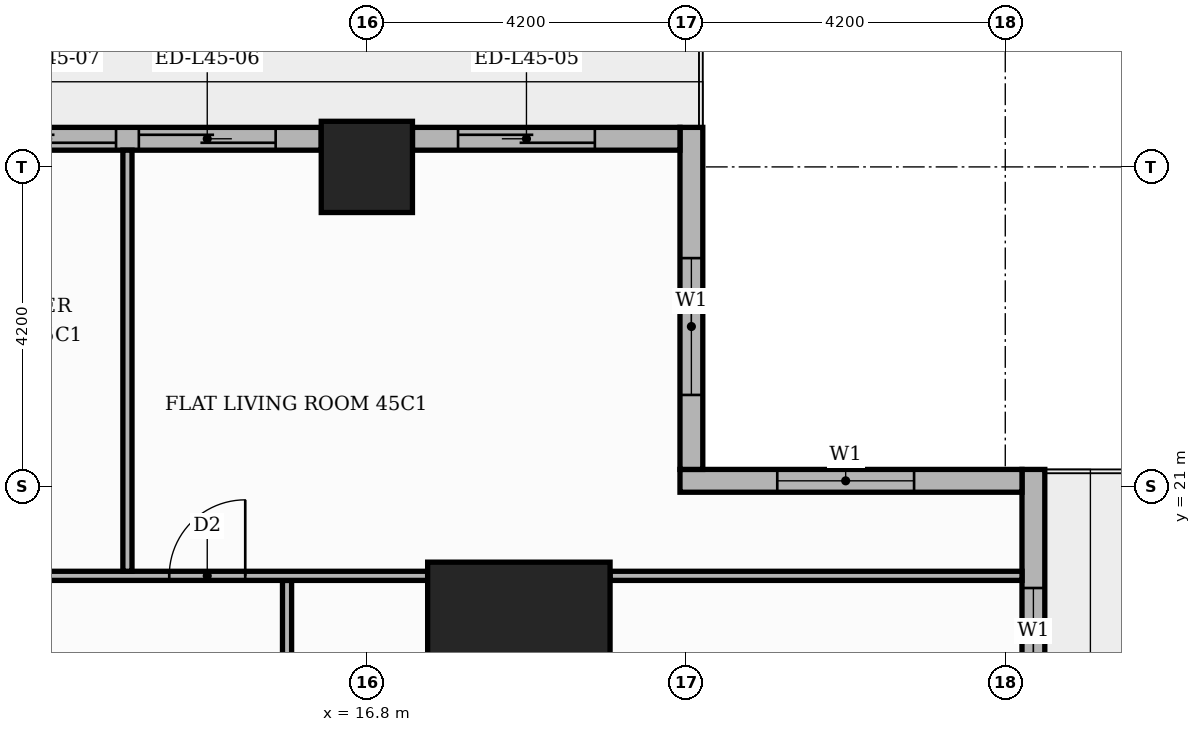
"""IFC4 building model, lengths in metres.
Left out: names, types, materials, properties, quantities, classifications, styles, units other than length and angle.
Written with IfcOpenShell. Run it as: python <this file> out.ifc"""

import sys

from ifc_helpers import new_model, si_unit, direction, frame, frame_2d, origin, origin_2d, place, context, subcontext, project, spatial, rectangle, extrude, element, fill, save


model = new_model("IFC4")
c1 = context("Model", 3, precision=1e-05, world=origin(), true_north=direction((0.0, 1.0)))
c2 = subcontext(c1, "Body", "Model", "MODEL_VIEW")
j1 = project(units=[si_unit("LENGTHUNIT", "METRE"), si_unit("PLANEANGLEUNIT", "RADIAN")], contexts=[c1])
p1 = place(None, origin())
s1 = spatial("IfcSite", under=j1, at=p1, CompositionType="ELEMENT")
p2 = place(p1, origin())
s2 = spatial("IfcBuilding", under=s1, at=p2, CompositionType="ELEMENT")
p3 = place(p2, frame((0.0, 0.0, 192.3)))
s3 = spatial("IfcBuildingStorey", under=s2, at=p3, CompositionType="ELEMENT", Elevation=192.3)
p4 = place(p3, frame((18.8, 18.8, 0.0), z_axis=(0.0, 0.0, 1.0), x_axis=(1.0, 0.0, 0.0)))
e1 = element("IfcColumn", 1, at=p4, inside=s3, PredefinedType="COLUMN", context=c2, shape_type="SweptSolid", body=[
    extrude(rectangle(XDim=2.4, YDim=2.4, at=origin_2d()), origin(), (0.0, 0.0, 1.0), 3.9),
])
p5 = place(p3, frame((16.8, 25.2, 0.0), z_axis=(0.0, 0.0, 1.0), x_axis=(1.0, 0.0, 0.0)))
e2 = element("IfcColumn", 2, at=p5, inside=s3, PredefinedType="COLUMN", context=c2, shape_type="SweptSolid", body=[
    extrude(rectangle(XDim=1.2, YDim=1.2, at=origin_2d()), origin(), (0.0, 0.0, 1.0), 3.9),
])
p6 = place(p3, frame((25.57, 17.4, 0.0), z_axis=(0.0, 0.0, 1.0), x_axis=(0.0, 1.0, 0.0)))
e3 = element("IfcWall", 3, at=p6, inside=s3, PredefinedType="STANDARD", context=c2, shape_type="SweptSolid", body=[
    extrude(rectangle(XDim=3.82, YDim=0.3, at=frame_2d((1.91, 0.0))), origin(), (0.0, 0.0, 1.0), 3.48),
])
p7 = place(p6, frame((0.46, 0.0, 0.9)))
e4 = element("IfcOpeningElement", 4, at=p7, cuts=e3, PredefinedType="OPENING", context=c2, shape_type="SweptSolid", body=[
    extrude(rectangle(XDim=1.8, YDim=2.1, at=frame_2d((0.9, 1.05))), frame((0.0, 0.16, 0.0), z_axis=(0.0, -1.0, 0.0), x_axis=(1.0, 0.0, 0.0)), (0.0, 0.0, 1.0), 0.32),
])
p8 = place(p3, frame((25.42, 21.07, 0.0), z_axis=(0.0, 0.0, 1.0), x_axis=(-1.0, 0.0, 0.0)))
e5 = element("IfcWall", 5, at=p8, inside=s3, PredefinedType="STANDARD", context=c2, shape_type="SweptSolid", body=[
    extrude(rectangle(XDim=4.5, YDim=0.3, at=frame_2d((2.25, 0.0))), origin(), (0.0, 0.0, 1.0), 3.48),
])
p9 = place(p8, frame((1.42, 0.0, 0.9)))
e6 = element("IfcOpeningElement", 6, at=p9, cuts=e5, PredefinedType="OPENING", context=c2, shape_type="SweptSolid", body=[
    extrude(rectangle(XDim=1.8, YDim=2.1, at=frame_2d((0.9, 1.05))), frame((0.0, 0.16, 0.0), z_axis=(0.0, -1.0, 0.0), x_axis=(1.0, 0.0, 0.0)), (0.0, 0.0, 1.0), 0.32),
])
p10 = place(p3, frame((21.07, 21.22, 0.0), z_axis=(0.0, 0.0, 1.0), x_axis=(0.0, 1.0, 0.0)))
e7 = element("IfcWall", 7, at=p10, inside=s3, PredefinedType="STANDARD", context=c2, shape_type="SweptSolid", body=[
    extrude(rectangle(XDim=4.5, YDim=0.3, at=frame_2d((2.25, 0.0))), origin(), (0.0, 0.0, 1.0), 3.48),
])
p11 = place(p10, frame((0.98, 0.0, 0.9)))
e8 = element("IfcOpeningElement", 8, at=p11, cuts=e7, PredefinedType="OPENING", context=c2, shape_type="SweptSolid", body=[
    extrude(rectangle(XDim=1.8, YDim=2.1, at=frame_2d((0.9, 1.05))), frame((0.0, 0.16, 0.0), z_axis=(0.0, -1.0, 0.0), x_axis=(1.0, 0.0, 0.0)), (0.0, 0.0, 1.0), 0.32),
])
p12 = place(p3, frame((20.92, 25.57, 0.0), z_axis=(0.0, 0.0, 1.0), x_axis=(-1.0, 0.0, 0.0)))
e9 = element("IfcWall", 9, at=p12, inside=s3, PredefinedType="STANDARD", context=c2, shape_type="SweptSolid", body=[
    extrude(rectangle(XDim=3.52, YDim=0.3, at=frame_2d((1.76, 0.0))), origin(), (0.0, 0.0, 1.0), 3.48),
])
p13 = place(p12, frame((1.12, 0.0, 0.0)))
e10 = element("IfcOpeningElement", 10, at=p13, cuts=e9, PredefinedType="OPENING", context=c2, shape_type="SweptSolid", body=[
    extrude(rectangle(XDim=1.8, YDim=2.4, at=frame_2d((0.9, 1.2))), frame((0.0, 0.16, 0.0), z_axis=(0.0, -1.0, 0.0), x_axis=(1.0, 0.0, 0.0)), (0.0, 0.0, 1.0), 0.32),
])
p14 = place(p3, frame((16.2, 25.57, 0.0), z_axis=(0.0, 0.0, 1.0), x_axis=(-1.0, 0.0, 0.0)))
e11 = element("IfcWall", 11, at=p14, inside=s3, PredefinedType="STANDARD", context=c2, shape_type="SweptSolid", body=[
    extrude(rectangle(XDim=7.2, YDim=0.3, at=frame_2d((3.6, 0.0))), origin(), (0.0, 0.0, 1.0), 3.48),
])
p15 = place(p14, frame((0.6, 0.0, 0.0)))
e12 = element("IfcOpeningElement", 12, at=p15, cuts=e11, PredefinedType="OPENING", context=c2, shape_type="SweptSolid", body=[
    extrude(rectangle(XDim=1.8, YDim=2.4, at=frame_2d((0.9, 1.2))), frame((0.0, 0.16, 0.0), z_axis=(0.0, -1.0, 0.0), x_axis=(1.0, 0.0, 0.0)), (0.0, 0.0, 1.0), 0.32),
])
p16 = place(p14, frame((2.7, 0.0, 0.0)))
e13 = element("IfcOpeningElement", 13, at=p16, cuts=e11, PredefinedType="OPENING", context=c2, shape_type="SweptSolid", body=[
    extrude(rectangle(XDim=1.8, YDim=2.4, at=frame_2d((0.9, 1.2))), frame((0.0, 0.16, 0.0), z_axis=(0.0, -1.0, 0.0), x_axis=(1.0, 0.0, 0.0)), (0.0, 0.0, 1.0), 0.32),
])
p17 = place(p14, frame((4.8, 0.0, 0.9)))
e14 = element("IfcOpeningElement", 14, at=p17, cuts=e11, PredefinedType="OPENING", context=c2, shape_type="SweptSolid", body=[
    extrude(rectangle(XDim=1.8, YDim=2.1, at=frame_2d((0.9, 1.05))), frame((0.0, 0.16, 0.0), z_axis=(0.0, -1.0, 0.0), x_axis=(1.0, 0.0, 0.0)), (0.0, 0.0, 1.0), 0.32),
])
p18 = place(p3, frame((15.75, 13.75, 0.0), z_axis=(0.0, 0.0, 1.0), x_axis=(0.0, 1.0, 0.0)))
e15 = element("IfcWall", 15, at=p18, inside=s3, PredefinedType="PARTITIONING", context=c2, shape_type="SweptSolid", body=[
    extrude(rectangle(XDim=6.01, YDim=0.12, at=frame_2d((3.005, 0.0))), origin(), (0.0, 0.0, 1.0), 3.48),
])
p19 = place(p18, frame((2.485, 0.0, 0.0)))
e16 = element("IfcOpeningElement", 16, at=p19, cuts=e15, PredefinedType="OPENING", context=c2, shape_type="SweptSolid", body=[
    extrude(rectangle(XDim=1.0, YDim=2.1, at=frame_2d((0.5, 1.05))), frame((0.0, 0.07, 0.0), z_axis=(0.0, -1.0, 0.0), x_axis=(1.0, 0.0, 0.0)), (0.0, 0.0, 1.0), 0.14),
])
p20 = place(p3, frame((5.35, 19.82, 0.0), z_axis=(0.0, 0.0, 1.0), x_axis=(1.0, 0.0, 0.0)))
e17 = element("IfcWall", 17, at=p20, inside=s3, PredefinedType="PARTITIONING", context=c2, shape_type="SweptSolid", body=[
    extrude(rectangle(XDim=12.25, YDim=0.12, at=frame_2d((6.125, 0.0))), origin(), (0.0, 0.0, 1.0), 3.48),
])
p21 = place(p20, frame((8.85, 0.0, 0.0)))
e18 = element("IfcOpeningElement", 18, at=p21, cuts=e17, PredefinedType="OPENING", context=c2, shape_type="SweptSolid", body=[
    extrude(rectangle(XDim=1.0, YDim=2.1, at=frame_2d((0.5, 1.05))), frame((0.0, 0.07, 0.0), z_axis=(0.0, -1.0, 0.0), x_axis=(1.0, 0.0, 0.0)), (0.0, 0.0, 1.0), 0.14),
])
p22 = place(p20, frame((5.75, 0.0, 0.0)))
e19 = element("IfcOpeningElement", 19, at=p22, cuts=e17, PredefinedType="OPENING", context=c2, shape_type="SweptSolid", body=[
    extrude(rectangle(XDim=0.9, YDim=2.1, at=frame_2d((0.45, 1.05))), frame((0.0, 0.07, 0.0), z_axis=(0.0, -1.0, 0.0), x_axis=(1.0, 0.0, 0.0)), (0.0, 0.0, 1.0), 0.14),
])
p23 = place(p3, frame((20.0, 19.82, 0.0), z_axis=(0.0, 0.0, 1.0), x_axis=(1.0, 0.0, 0.0)))
e20 = element("IfcWall", 20, at=p23, inside=s3, PredefinedType="PARTITIONING", context=c2, shape_type="SweptSolid", body=[
    extrude(rectangle(XDim=5.42, YDim=0.12, at=frame_2d((2.71, 0.0))), origin(), (0.0, 0.0, 1.0), 3.48),
])
p24 = place(p3, frame((13.65, 19.88, 0.0), z_axis=(0.0, 0.0, 1.0), x_axis=(0.0, 1.0, 0.0)))
e21 = element("IfcWall", 21, at=p24, inside=s3, PredefinedType="PARTITIONING", context=c2, shape_type="SweptSolid", body=[
    extrude(rectangle(XDim=5.54, YDim=0.12, at=frame_2d((2.77, 0.0))), origin(), (0.0, 0.0, 1.0), 3.48),
])
p25 = place(p7, origin())
e22 = element("IfcWindow", 22, at=p25, inside=s3, PartitioningType="SINGLE_PANEL", PredefinedType="WINDOW", context=c2, shape_type="SweptSolid", body=[
    extrude(rectangle(XDim=1.8, YDim=2.1, at=frame_2d((0.9, 1.05))), frame((0.0, 0.03, 0.0), z_axis=(0.0, -1.0, 0.0), x_axis=(1.0, 0.0, 0.0)), (0.0, 0.0, 1.0), 0.06),
])
fill(e4, e22)
p26 = place(p9, origin())
e23 = element("IfcWindow", 23, at=p26, inside=s3, PartitioningType="SINGLE_PANEL", PredefinedType="WINDOW", context=c2, shape_type="SweptSolid", body=[
    extrude(rectangle(XDim=1.8, YDim=2.1, at=frame_2d((0.9, 1.05))), frame((0.0, 0.03, 0.0), z_axis=(0.0, -1.0, 0.0), x_axis=(1.0, 0.0, 0.0)), (0.0, 0.0, 1.0), 0.06),
])
fill(e6, e23)
p27 = place(p11, origin())
e24 = element("IfcWindow", 24, at=p27, inside=s3, PartitioningType="SINGLE_PANEL", PredefinedType="WINDOW", context=c2, shape_type="SweptSolid", body=[
    extrude(rectangle(XDim=1.8, YDim=2.1, at=frame_2d((0.9, 1.05))), frame((0.0, 0.03, 0.0), z_axis=(0.0, -1.0, 0.0), x_axis=(1.0, 0.0, 0.0)), (0.0, 0.0, 1.0), 0.06),
])
fill(e8, e24)
p28 = place(p13, origin())
e25 = element("IfcDoor", 25, at=p28, inside=s3, OperationType="SLIDING_TO_RIGHT", PredefinedType="DOOR", context=c2, shape_type="SweptSolid", body=[
    extrude(rectangle(XDim=1.8, YDim=2.4, at=frame_2d((0.9, 1.2))), frame((0.0, 0.025, 0.0), z_axis=(0.0, -1.0, 0.0), x_axis=(1.0, 0.0, 0.0)), (0.0, 0.0, 1.0), 0.05),
])
fill(e10, e25)
p29 = place(p15, origin())
e26 = element("IfcDoor", 26, at=p29, inside=s3, OperationType="SLIDING_TO_LEFT", PredefinedType="DOOR", context=c2, shape_type="SweptSolid", body=[
    extrude(rectangle(XDim=1.8, YDim=2.4, at=frame_2d((0.9, 1.2))), frame((0.0, 0.025, 0.0), z_axis=(0.0, -1.0, 0.0), x_axis=(1.0, 0.0, 0.0)), (0.0, 0.0, 1.0), 0.05),
])
fill(e12, e26)
p30 = place(p16, origin())
e27 = element("IfcDoor", 27, at=p30, inside=s3, OperationType="SLIDING_TO_RIGHT", PredefinedType="DOOR", context=c2, shape_type="SweptSolid", body=[
    extrude(rectangle(XDim=1.8, YDim=2.4, at=frame_2d((0.9, 1.2))), frame((0.0, 0.025, 0.0), z_axis=(0.0, -1.0, 0.0), x_axis=(1.0, 0.0, 0.0)), (0.0, 0.0, 1.0), 0.05),
])
fill(e13, e27)
p31 = place(p21, origin())
e28 = element("IfcDoor", 28, at=p31, inside=s3, OperationType="SINGLE_SWING_RIGHT", PredefinedType="DOOR", context=c2, shape_type="SweptSolid", body=[
    extrude(rectangle(XDim=1.0, YDim=2.1, at=frame_2d((0.5, 1.05))), frame((0.0, 0.025, 0.0), z_axis=(0.0, -1.0, 0.0), x_axis=(1.0, 0.0, 0.0)), (0.0, 0.0, 1.0), 0.05),
])
fill(e18, e28)
save(model, sys.argv[1])
